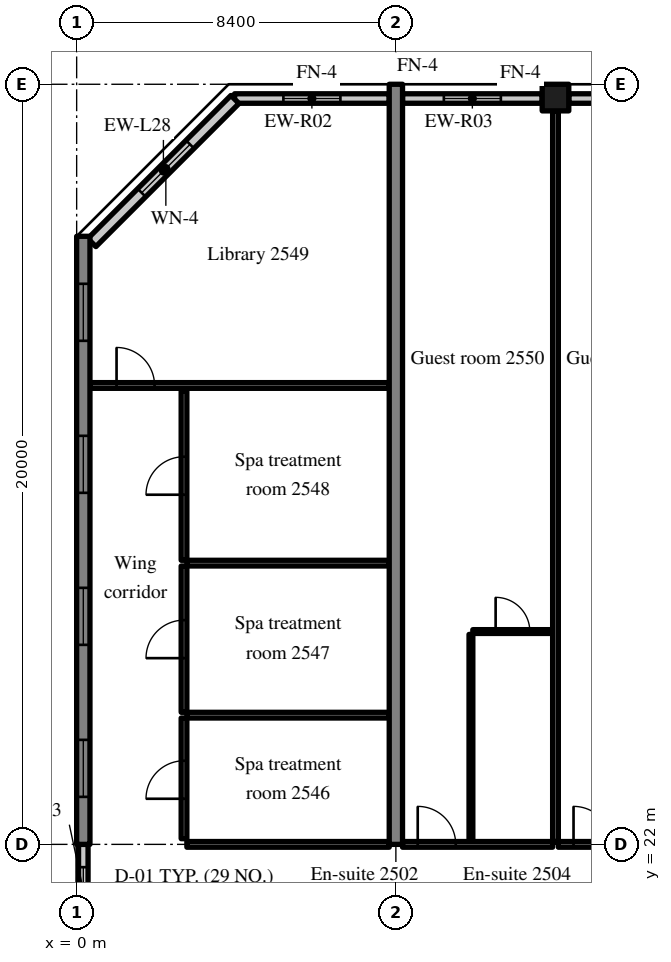
"""IFC4 building model, lengths in metres.
Left out: names, types, materials, properties, quantities, classifications, styles, units other than length and angle.
Written with IfcOpenShell. Run it as: python <this file> out.ifc"""

import sys

from ifc_helpers import new_model, si_unit, direction, frame, frame_2d, origin, origin_2d, place, context, subcontext, project, spatial, rectangle, extrude, source, transform, mapped, element, fill, save


model = new_model("IFC4")
c1 = context("Model", 3, precision=1e-05, world=origin(), true_north=direction((0.0, 1.0)))
c2 = subcontext(c1, "Body", "Model", "MODEL_VIEW")
j1 = project(units=[si_unit("LENGTHUNIT", "METRE"), si_unit("PLANEANGLEUNIT", "RADIAN")], contexts=[c1])
p1 = place(None, origin())
s1 = spatial("IfcSite", under=j1, at=p1, CompositionType="ELEMENT")
p2 = place(p1, origin())
s2 = spatial("IfcBuilding", under=s1, at=p2, CompositionType="ELEMENT")
p3 = place(p2, frame((0.0, 0.0, 106.6)))
s3 = spatial("IfcBuildingStorey", under=s2, at=p3, CompositionType="ELEMENT", Elevation=106.6)
m1 = source(origin(), c2, "Body", "SweptSolid", [
    extrude(rectangle(XDim=16.0, YDim=0.35, at=frame_2d((8.0, 0.0))), origin(), (0.0, 0.0, 1.0), 3.52),
])
p4 = place(p3, frame((0.175, 22.0, 0.0), z_axis=(0.0, 0.0, 1.0), x_axis=(0.0, 1.0, 0.0)))
e1 = element("IfcWall", 1, at=p4, inside=s3, PredefinedType="SHEAR", context=c2, shape_type="MappedRepresentation", body=[
    mapped(m1, transform((0.0, 0.0, 0.0), scale=1.0)),
])
m2 = source(origin(), c2, "Body", "SweptSolid", [
    extrude(rectangle(XDim=1.5, YDim=1.5, at=frame_2d((0.75, 0.75))), frame((0.0, 0.185, 0.0), z_axis=(0.0, -1.0, 0.0), x_axis=(1.0, 0.0, 0.0)), (0.0, 0.0, 1.0), 0.37),
])
p5 = place(p4, frame((1.25, 0.0, 0.9)))
e2 = element("IfcOpeningElement", 2, at=p5, cuts=e1, PredefinedType="OPENING", context=c2, shape_type="MappedRepresentation", body=[
    mapped(m2, transform((0.0, 0.0, 0.0), scale=1.0)),
])
p6 = place(p4, frame((5.25, 0.0, 0.9)))
e3 = element("IfcOpeningElement", 3, at=p6, cuts=e1, PredefinedType="OPENING", context=c2, shape_type="MappedRepresentation", body=[
    mapped(m2, transform((0.0, 0.0, 0.0), scale=1.0)),
])
p7 = place(p4, frame((9.25, 0.0, 0.9)))
e4 = element("IfcOpeningElement", 4, at=p7, cuts=e1, PredefinedType="OPENING", context=c2, shape_type="MappedRepresentation", body=[
    mapped(m2, transform((0.0, 0.0, 0.0), scale=1.0)),
])
p8 = place(p4, frame((13.25, 0.0, 0.9)))
e5 = element("IfcOpeningElement", 5, at=p8, cuts=e1, PredefinedType="OPENING", context=c2, shape_type="MappedRepresentation", body=[
    mapped(m2, transform((0.0, 0.0, 0.0), scale=1.0)),
])
m3 = source(origin(), c2, "Body", "SweptSolid", [
    extrude(rectangle(XDim=20.0, YDim=0.35, at=frame_2d((10.0, 0.0))), origin(), (0.0, 0.0, 1.0), 3.52),
])
p9 = place(p3, frame((8.4, 22.0, 0.0), z_axis=(0.0, 0.0, 1.0), x_axis=(0.0, 1.0, 0.0)))
e6 = element("IfcWall", 6, at=p9, inside=s3, PredefinedType="SHEAR", context=c2, shape_type="MappedRepresentation", body=[
    mapped(m3, transform((0.0, 0.0, 0.0), scale=1.0)),
])
m4 = source(origin(), c2, "Body", "SweptSolid", [
    extrude(rectangle(XDim=0.7, YDim=0.7, at=origin_2d()), origin(), (0.0, 0.0, 1.0), 3.52),
])
p10 = place(p3, frame((12.6, 41.65, 0.0), z_axis=(0.0, 0.0, 1.0), x_axis=(1.0, 0.0, 0.0)))
e7 = element("IfcColumn", 7, at=p10, inside=s3, PredefinedType="COLUMN", context=c2, shape_type="MappedRepresentation", body=[
    mapped(m4, transform((0.0, 0.0, 0.0), scale=1.0)),
])
m5 = source(origin(), c2, "Body", "SweptSolid", [
    extrude(rectangle(XDim=4.07, YDim=0.25, at=frame_2d((2.035, 0.0))), origin(), (0.0, 0.0, 1.0), 2.82),
])
p11 = place(p3, frame((8.225, 41.625, 0.0), z_axis=(0.0, 0.0, 1.0), x_axis=(-1.0, 0.0, 0.0)))
e8 = element("IfcWall", 8, at=p11, inside=s3, PredefinedType="SOLIDWALL", context=c2, shape_type="MappedRepresentation", body=[
    mapped(m5, transform((0.0, 0.0, 0.0), scale=1.0)),
])
m6 = source(origin(), c2, "Body", "SweptSolid", [
    extrude(rectangle(XDim=1.5, YDim=1.5, at=frame_2d((0.75, 0.75))), frame((0.0, 0.135, 0.0), z_axis=(0.0, -1.0, 0.0), x_axis=(1.0, 0.0, 0.0)), (0.0, 0.0, 1.0), 0.27),
])
p12 = place(p11, frame((1.285, 0.0, 0.9)))
e9 = element("IfcOpeningElement", 9, at=p12, cuts=e8, PredefinedType="OPENING", context=c2, shape_type="MappedRepresentation", body=[
    mapped(m6, transform((0.0, 0.0, 0.0), scale=1.0)),
])
m7 = source(origin(), c2, "Body", "SweptSolid", [
    extrude(rectangle(XDim=3.675, YDim=0.25, at=frame_2d((1.837, 0.0))), origin(), (0.0, 0.0, 1.0), 2.82),
])
p13 = place(p3, frame((12.25, 41.625, 0.0), z_axis=(0.0, 0.0, 1.0), x_axis=(-1.0, 0.0, 0.0)))
e10 = element("IfcWall", 10, at=p13, inside=s3, PredefinedType="SOLIDWALL", context=c2, shape_type="MappedRepresentation", body=[
    mapped(m7, transform((0.0, 0.0, 0.0), scale=1.0)),
])
p14 = place(p13, frame((1.087, 0.0, 0.9)))
e11 = element("IfcOpeningElement", 11, at=p14, cuts=e10, PredefinedType="OPENING", context=c2, shape_type="MappedRepresentation", body=[
    mapped(m6, transform((0.0, 0.0, 0.0), scale=1.0)),
])
p15 = place(p3, frame((16.625, 41.625, 0.0), z_axis=(0.0, 0.0, 1.0), x_axis=(-1.0, 0.0, 0.0)))
e12 = element("IfcWall", 12, at=p15, inside=s3, PredefinedType="SOLIDWALL", context=c2, shape_type="MappedRepresentation", body=[
    mapped(m7, transform((0.0, 0.0, 0.0), scale=1.0)),
])
p16 = place(p15, frame((1.087, 0.0, 0.9)))
e13 = element("IfcOpeningElement", 13, at=p16, cuts=e12, PredefinedType="OPENING", context=c2, shape_type="MappedRepresentation", body=[
    mapped(m6, transform((0.0, 0.0, 0.0), scale=1.0)),
])
m8 = source(origin(), c2, "Body", "SweptSolid", [
    extrude(rectangle(XDim=5.326, YDim=0.3, at=frame_2d((2.663, 0.0))), origin(), (0.0, 0.0, 1.0), 3.52),
])
p17 = place(p3, frame((4.166, 41.6, 0.0), z_axis=(0.0, 0.0, 1.0), x_axis=(-0.707106781187, -0.707106781187, 0.0)))
e14 = element("IfcWall", 14, at=p17, inside=s3, PredefinedType="SOLIDWALL", context=c2, shape_type="MappedRepresentation", body=[
    mapped(m8, transform((0.0, 0.0, 0.0), scale=1.0)),
])
m9 = source(origin(), c2, "Body", "SweptSolid", [
    extrude(rectangle(XDim=1.8, YDim=1.5, at=frame_2d((0.9, 0.75))), frame((0.0, 0.16, 0.0), z_axis=(0.0, -1.0, 0.0), x_axis=(1.0, 0.0, 0.0)), (0.0, 0.0, 1.0), 0.32),
])
p18 = place(p17, frame((1.672, 0.0, 0.9)))
e15 = element("IfcOpeningElement", 15, at=p18, cuts=e14, PredefinedType="OPENING", context=c2, shape_type="MappedRepresentation", body=[
    mapped(m9, transform((0.0, 0.0, 0.0), scale=1.0)),
])
m10 = source(origin(), c2, "Body", "SweptSolid", [
    extrude(rectangle(XDim=2.4, YDim=0.25, at=frame_2d((1.2, 0.0))), origin(), (0.0, 0.0, 1.0), 2.62),
])
p19 = place(p3, frame((0.175, 19.6, 0.0), z_axis=(0.0, 0.0, 1.0), x_axis=(0.0, 1.0, 0.0)))
e16 = element("IfcWall", 16, at=p19, inside=s3, PredefinedType="SOLIDWALL", context=c2, shape_type="MappedRepresentation", body=[
    mapped(m10, transform((0.0, 0.0, 0.0), scale=1.0)),
])
m11 = source(origin(), c2, "Body", "SweptSolid", [
    extrude(rectangle(XDim=1.2, YDim=1.5, at=frame_2d((0.6, 0.75))), frame((0.0, 0.135, 0.0), z_axis=(0.0, -1.0, 0.0), x_axis=(1.0, 0.0, 0.0)), (0.0, 0.0, 1.0), 0.27),
])
p20 = place(p19, frame((0.6, 0.0, 0.9)))
e17 = element("IfcOpeningElement", 17, at=p20, cuts=e16, PredefinedType="OPENING", context=c2, shape_type="MappedRepresentation", body=[
    mapped(m11, transform((0.0, 0.0, 0.0), scale=1.0)),
])
m12 = source(origin(), c2, "Body", "SweptSolid", [
    extrude(rectangle(XDim=5.325, YDim=0.15, at=frame_2d((2.663, 0.0))), origin(), (0.0, 0.0, 1.0), 2.82),
])
p21 = place(p3, frame((2.9, 22.0, 0.0), z_axis=(0.0, 0.0, 1.0), x_axis=(1.0, 0.0, 0.0)))
e18 = element("IfcWall", 18, at=p21, inside=s3, PredefinedType="PARTITIONING", context=c2, shape_type="MappedRepresentation", body=[
    mapped(m12, transform((0.0, 0.0, 0.0), scale=1.0)),
])
m13 = source(origin(), c2, "Body", "SweptSolid", [
    extrude(rectangle(XDim=3.175, YDim=0.15, at=frame_2d((1.587, 0.0))), origin(), (0.0, 0.0, 1.0), 3.52),
])
p22 = place(p3, frame((2.825, 22.15, 0.0), z_axis=(0.0, 0.0, 1.0), x_axis=(0.0, 1.0, 0.0)))
e19 = element("IfcWall", 19, at=p22, inside=s3, PredefinedType="PARTITIONING", context=c2, shape_type="MappedRepresentation", body=[
    mapped(m13, transform((0.0, 0.0, 0.0), scale=1.0)),
])
m14 = source(origin(), c2, "Body", "SweptSolid", [
    extrude(rectangle(XDim=1.0, YDim=2.1, at=frame_2d((0.5, 1.05))), frame((0.0, 0.085, 0.0), z_axis=(0.0, -1.0, 0.0), x_axis=(1.0, 0.0, 0.0)), (0.0, 0.0, 1.0), 0.17),
])
p23 = place(p22, frame((1.05, 0.0, 0.0)))
e20 = element("IfcOpeningElement", 20, at=p23, cuts=e19, PredefinedType="OPENING", context=c2, shape_type="MappedRepresentation", body=[
    mapped(m14, transform((0.0, 0.0, 0.0), scale=1.0)),
])
m15 = source(origin(), c2, "Body", "SweptSolid", [
    extrude(rectangle(XDim=5.325, YDim=0.15, at=frame_2d((2.663, 0.0))), origin(), (0.0, 0.0, 1.0), 3.52),
])
p24 = place(p3, frame((2.9, 25.4, 0.0), z_axis=(0.0, 0.0, 1.0), x_axis=(1.0, 0.0, 0.0)))
e21 = element("IfcWall", 21, at=p24, inside=s3, PredefinedType="PARTITIONING", context=c2, shape_type="MappedRepresentation", body=[
    mapped(m15, transform((0.0, 0.0, 0.0), scale=1.0)),
])
m16 = source(origin(), c2, "Body", "SweptSolid", [
    extrude(rectangle(XDim=3.85, YDim=0.15, at=frame_2d((1.925, 0.0))), origin(), (0.0, 0.0, 1.0), 3.52),
])
p25 = place(p3, frame((2.825, 25.475, 0.0), z_axis=(0.0, 0.0, 1.0), x_axis=(0.0, 1.0, 0.0)))
e22 = element("IfcWall", 22, at=p25, inside=s3, PredefinedType="PARTITIONING", context=c2, shape_type="MappedRepresentation", body=[
    mapped(m16, transform((0.0, 0.0, 0.0), scale=1.0)),
])
p26 = place(p25, frame((1.425, 0.0, 0.0)))
e23 = element("IfcOpeningElement", 23, at=p26, cuts=e22, PredefinedType="OPENING", context=c2, shape_type="MappedRepresentation", body=[
    mapped(m14, transform((0.0, 0.0, 0.0), scale=1.0)),
])
p27 = place(p3, frame((2.9, 29.4, 0.0), z_axis=(0.0, 0.0, 1.0), x_axis=(1.0, 0.0, 0.0)))
e24 = element("IfcWall", 24, at=p27, inside=s3, PredefinedType="PARTITIONING", context=c2, shape_type="MappedRepresentation", body=[
    mapped(m15, transform((0.0, 0.0, 0.0), scale=1.0)),
])
m17 = source(origin(), c2, "Body", "SweptSolid", [
    extrude(rectangle(XDim=4.45, YDim=0.15, at=frame_2d((2.225, 0.0))), origin(), (0.0, 0.0, 1.0), 3.52),
])
p28 = place(p3, frame((2.825, 29.475, 0.0), z_axis=(0.0, 0.0, 1.0), x_axis=(0.0, 1.0, 0.0)))
e25 = element("IfcWall", 25, at=p28, inside=s3, PredefinedType="PARTITIONING", context=c2, shape_type="MappedRepresentation", body=[
    mapped(m17, transform((0.0, 0.0, 0.0), scale=1.0)),
])
p29 = place(p28, frame((1.725, 0.0, 0.0)))
e26 = element("IfcOpeningElement", 26, at=p29, cuts=e25, PredefinedType="OPENING", context=c2, shape_type="MappedRepresentation", body=[
    mapped(m14, transform((0.0, 0.0, 0.0), scale=1.0)),
])
m18 = source(origin(), c2, "Body", "SweptSolid", [
    extrude(rectangle(XDim=7.875, YDim=0.15, at=frame_2d((3.938, 0.0))), origin(), (0.0, 0.0, 1.0), 3.52),
])
p30 = place(p3, frame((0.35, 34.075, 0.0), z_axis=(0.0, 0.0, 1.0), x_axis=(1.0, 0.0, 0.0)))
e27 = element("IfcWall", 27, at=p30, inside=s3, PredefinedType="PARTITIONING", context=c2, shape_type="MappedRepresentation", body=[
    mapped(m18, transform((0.0, 0.0, 0.0), scale=1.0)),
])
p31 = place(p30, frame((0.7, 0.0, 0.0)))
e28 = element("IfcOpeningElement", 28, at=p31, cuts=e27, PredefinedType="OPENING", context=c2, shape_type="MappedRepresentation", body=[
    mapped(m14, transform((0.0, 0.0, 0.0), scale=1.0)),
])
m19 = source(origin(), c2, "Body", "SweptSolid", [
    extrude(rectangle(XDim=5.45, YDim=0.1, at=frame_2d((2.725, 0.0))), origin(), (0.0, 0.0, 1.0), 3.52),
])
p32 = place(p3, frame((10.375, 22.075, 0.0), z_axis=(0.0, 0.0, 1.0), x_axis=(0.0, 1.0, 0.0)))
e29 = element("IfcWall", 29, at=p32, inside=s3, PredefinedType="PARTITIONING", context=c2, shape_type="MappedRepresentation", body=[
    mapped(m19, transform((0.0, 0.0, 0.0), scale=1.0)),
])
m20 = source(origin(), c2, "Body", "SweptSolid", [
    extrude(rectangle(XDim=2.1, YDim=0.1, at=frame_2d((1.05, 0.0))), origin(), (0.0, 0.0, 1.0), 3.52),
])
p33 = place(p3, frame((10.425, 27.6, 0.0), z_axis=(0.0, 0.0, 1.0), x_axis=(1.0, 0.0, 0.0)))
e30 = element("IfcWall", 30, at=p33, inside=s3, PredefinedType="PARTITIONING", context=c2, shape_type="MappedRepresentation", body=[
    mapped(m20, transform((0.0, 0.0, 0.0), scale=1.0)),
])
m21 = source(origin(), c2, "Body", "SweptSolid", [
    extrude(rectangle(XDim=0.9, YDim=2.1, at=frame_2d((0.45, 1.05))), frame((0.0, 0.06, 0.0), z_axis=(0.0, -1.0, 0.0), x_axis=(1.0, 0.0, 0.0)), (0.0, 0.0, 1.0), 0.12),
])
p34 = place(p33, frame((0.6, 0.0, 0.0)))
e31 = element("IfcOpeningElement", 31, at=p34, cuts=e30, PredefinedType="OPENING", context=c2, shape_type="MappedRepresentation", body=[
    mapped(m21, transform((0.0, 0.0, 0.0), scale=1.0)),
])
m22 = source(origin(), c2, "Body", "SweptSolid", [
    extrude(rectangle(XDim=3.95, YDim=0.15, at=frame_2d((1.975, 0.0))), origin(), (0.0, 0.0, 1.0), 2.82),
])
p35 = place(p3, frame((8.575, 22.0, 0.0), z_axis=(0.0, 0.0, 1.0), x_axis=(1.0, 0.0, 0.0)))
e32 = element("IfcWall", 32, at=p35, inside=s3, PredefinedType="PARTITIONING", context=c2, shape_type="MappedRepresentation", body=[
    mapped(m22, transform((0.0, 0.0, 0.0), scale=1.0)),
])
p36 = place(p35, frame((0.4, 0.0, 0.0)))
e33 = element("IfcOpeningElement", 33, at=p36, cuts=e32, PredefinedType="OPENING", context=c2, shape_type="MappedRepresentation", body=[
    mapped(m14, transform((0.0, 0.0, 0.0), scale=1.0)),
])
p37 = place(p3, frame((12.675, 22.0, 0.0), z_axis=(0.0, 0.0, 1.0), x_axis=(1.0, 0.0, 0.0)))
e34 = element("IfcWall", 34, at=p37, inside=s3, PredefinedType="PARTITIONING", context=c2, shape_type="MappedRepresentation", body=[
    mapped(m22, transform((0.0, 0.0, 0.0), scale=1.0)),
])
p38 = place(p37, frame((0.4, 0.0, 0.0)))
e35 = element("IfcOpeningElement", 35, at=p38, cuts=e34, PredefinedType="OPENING", context=c2, shape_type="MappedRepresentation", body=[
    mapped(m14, transform((0.0, 0.0, 0.0), scale=1.0)),
])
m23 = source(origin(), c2, "Body", "SweptSolid", [
    extrude(rectangle(XDim=19.225, YDim=0.15, at=frame_2d((9.613, 0.0))), origin(), (0.0, 0.0, 1.0), 3.52),
])
p39 = place(p3, frame((12.6, 22.075, 0.0), z_axis=(0.0, 0.0, 1.0), x_axis=(0.0, 1.0, 0.0)))
e36 = element("IfcWall", 36, at=p39, inside=s3, PredefinedType="PARTITIONING", context=c2, shape_type="MappedRepresentation", body=[
    mapped(m23, transform((0.0, 0.0, 0.0), scale=1.0)),
])
m24 = source(origin(), c2, "Body", "SweptSolid", [
    extrude(rectangle(XDim=1.5, YDim=1.5, at=frame_2d((0.75, 0.75))), frame((0.0, 0.03, 0.0), z_axis=(0.0, -1.0, 0.0), x_axis=(1.0, 0.0, 0.0)), (0.0, 0.0, 1.0), 0.06),
])
p40 = place(p12, origin())
e37 = element("IfcWindow", 37, at=p40, inside=s3, PartitioningType="SINGLE_PANEL", PredefinedType="WINDOW", context=c2, shape_type="MappedRepresentation", body=[
    mapped(m24, transform((0.0, 0.0, 0.0), scale=1.0)),
])
fill(e9, e37)
p41 = place(p14, origin())
e38 = element("IfcWindow", 38, at=p41, inside=s3, PartitioningType="SINGLE_PANEL", PredefinedType="WINDOW", context=c2, shape_type="MappedRepresentation", body=[
    mapped(m24, transform((0.0, 0.0, 0.0), scale=1.0)),
])
fill(e11, e38)
m25 = source(origin(), c2, "Body", "SweptSolid", [
    extrude(rectangle(XDim=1.8, YDim=1.5, at=frame_2d((0.9, 0.75))), frame((0.0, 0.03, 0.0), z_axis=(0.0, -1.0, 0.0), x_axis=(1.0, 0.0, 0.0)), (0.0, 0.0, 1.0), 0.06),
])
p42 = place(p18, origin())
e39 = element("IfcWindow", 39, at=p42, inside=s3, PartitioningType="SINGLE_PANEL", PredefinedType="WINDOW", context=c2, shape_type="MappedRepresentation", body=[
    mapped(m25, transform((0.0, 0.0, 0.0), scale=1.0)),
])
fill(e15, e39)
p43 = place(p5, origin())
e40 = element("IfcWindow", 40, at=p43, inside=s3, PartitioningType="SINGLE_PANEL", PredefinedType="WINDOW", context=c2, shape_type="MappedRepresentation", body=[
    mapped(m24, transform((0.0, 0.0, 0.0), scale=1.0)),
])
fill(e2, e40)
p44 = place(p6, origin())
e41 = element("IfcWindow", 41, at=p44, inside=s3, PartitioningType="SINGLE_PANEL", PredefinedType="WINDOW", context=c2, shape_type="MappedRepresentation", body=[
    mapped(m24, transform((0.0, 0.0, 0.0), scale=1.0)),
])
fill(e3, e41)
p45 = place(p7, origin())
e42 = element("IfcWindow", 42, at=p45, inside=s3, PartitioningType="SINGLE_PANEL", PredefinedType="WINDOW", context=c2, shape_type="MappedRepresentation", body=[
    mapped(m24, transform((0.0, 0.0, 0.0), scale=1.0)),
])
fill(e4, e42)
p46 = place(p8, origin())
e43 = element("IfcWindow", 43, at=p46, inside=s3, PartitioningType="SINGLE_PANEL", PredefinedType="WINDOW", context=c2, shape_type="MappedRepresentation", body=[
    mapped(m24, transform((0.0, 0.0, 0.0), scale=1.0)),
])
fill(e5, e43)
m26 = source(origin(), c2, "Body", "SweptSolid", [
    extrude(rectangle(XDim=1.2, YDim=1.5, at=frame_2d((0.6, 0.75))), frame((0.0, 0.03, 0.0), z_axis=(0.0, -1.0, 0.0), x_axis=(1.0, 0.0, 0.0)), (0.0, 0.0, 1.0), 0.06),
])
p47 = place(p20, origin())
e44 = element("IfcWindow", 44, at=p47, inside=s3, PartitioningType="SINGLE_PANEL", PredefinedType="WINDOW", context=c2, shape_type="MappedRepresentation", body=[
    mapped(m26, transform((0.0, 0.0, 0.0), scale=1.0)),
])
fill(e17, e44)
m27 = source(origin(), c2, "Body", "SweptSolid", [
    extrude(rectangle(XDim=1.0, YDim=2.1, at=frame_2d((0.5, 1.05))), frame((0.0, 0.025, 0.0), z_axis=(0.0, -1.0, 0.0), x_axis=(1.0, 0.0, 0.0)), (0.0, 0.0, 1.0), 0.05),
])
p48 = place(p23, origin())
e45 = element("IfcDoor", 45, at=p48, inside=s3, OperationType="SINGLE_SWING_LEFT", PredefinedType="DOOR", context=c2, shape_type="MappedRepresentation", body=[
    mapped(m27, transform((0.0, 0.0, 0.0), scale=1.0)),
])
fill(e20, e45)
p49 = place(p26, origin())
e46 = element("IfcDoor", 46, at=p49, inside=s3, OperationType="SINGLE_SWING_LEFT", PredefinedType="DOOR", context=c2, shape_type="MappedRepresentation", body=[
    mapped(m27, transform((0.0, 0.0, 0.0), scale=1.0)),
])
fill(e23, e46)
p50 = place(p29, origin())
e47 = element("IfcDoor", 47, at=p50, inside=s3, OperationType="SINGLE_SWING_LEFT", PredefinedType="DOOR", context=c2, shape_type="MappedRepresentation", body=[
    mapped(m27, transform((0.0, 0.0, 0.0), scale=1.0)),
])
fill(e26, e47)
p51 = place(p31, origin())
e48 = element("IfcDoor", 48, at=p51, inside=s3, OperationType="SINGLE_SWING_LEFT", PredefinedType="DOOR", context=c2, shape_type="MappedRepresentation", body=[
    mapped(m27, transform((0.0, 0.0, 0.0), scale=1.0)),
])
fill(e28, e48)
m28 = source(origin(), c2, "Body", "SweptSolid", [
    extrude(rectangle(XDim=0.9, YDim=2.1, at=frame_2d((0.45, 1.05))), frame((0.0, 0.025, 0.0), z_axis=(0.0, -1.0, 0.0), x_axis=(1.0, 0.0, 0.0)), (0.0, 0.0, 1.0), 0.05),
])
p52 = place(p34, origin())
e49 = element("IfcDoor", 49, at=p52, inside=s3, OperationType="SINGLE_SWING_LEFT", PredefinedType="DOOR", context=c2, shape_type="MappedRepresentation", body=[
    mapped(m28, transform((0.0, 0.0, 0.0), scale=1.0)),
])
fill(e31, e49)
p53 = place(p36, origin())
e50 = element("IfcDoor", 50, at=p53, inside=s3, OperationType="SINGLE_SWING_LEFT", PredefinedType="DOOR", context=c2, shape_type="MappedRepresentation", body=[
    mapped(m27, transform((0.0, 0.0, 0.0), scale=1.0)),
])
fill(e33, e50)
p54 = place(p38, origin())
e51 = element("IfcDoor", 51, at=p54, inside=s3, OperationType="SINGLE_SWING_LEFT", PredefinedType="DOOR", context=c2, shape_type="MappedRepresentation", body=[
    mapped(m27, transform((0.0, 0.0, 0.0), scale=1.0)),
])
fill(e35, e51)
save(model, sys.argv[1])
